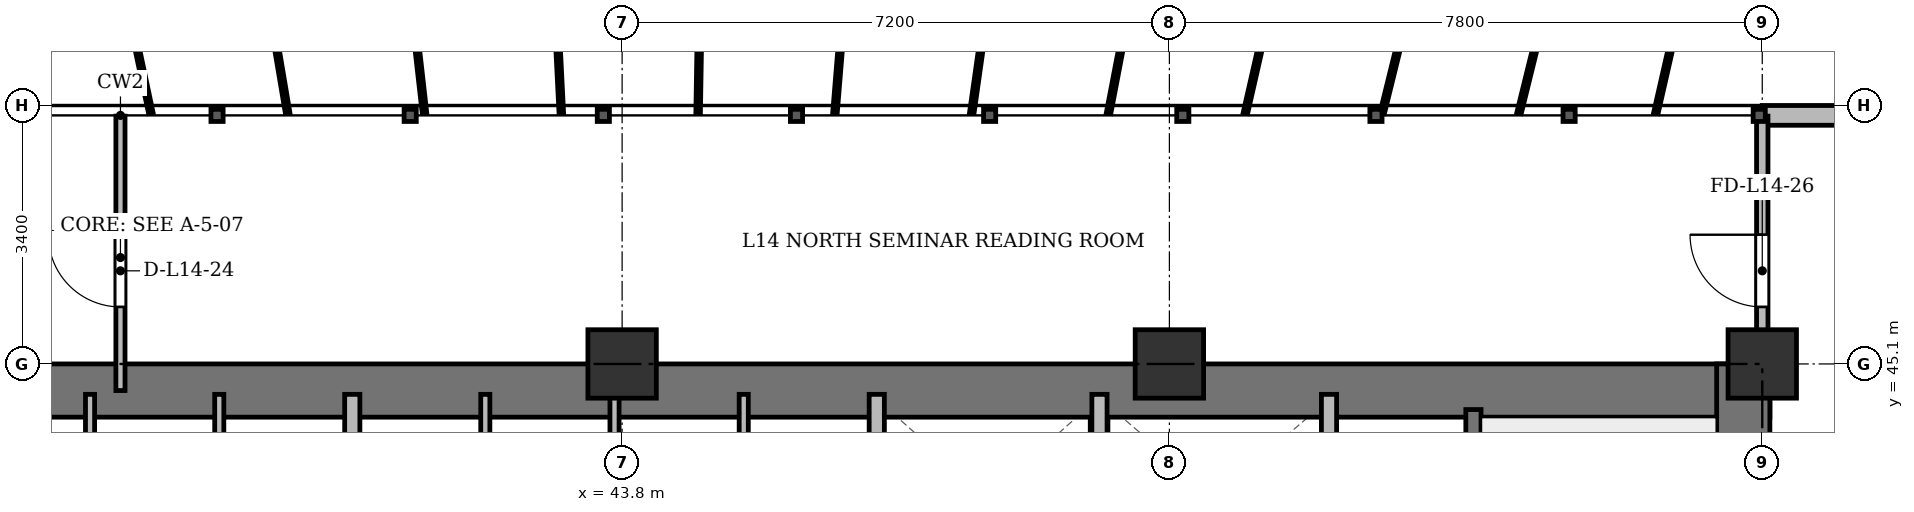
"""IFC4 building model, lengths in metres.
Left out: names, types, materials, properties, quantities, classifications, styles, units other than length and angle.
Written with IfcOpenShell. Run it as: python <this file> out.ifc"""

import sys

from ifc_helpers import new_model, si_unit, direction, frame, frame_2d, origin, origin_2d, place, context, subcontext, project, spatial, rectangle, extrude, source, transform, mapped, element, fill, save


model = new_model("IFC4")
c1 = context("Model", 3, precision=1e-05, world=origin(), true_north=direction((0.0, 1.0)))
c2 = subcontext(c1, "Body", "Model", "MODEL_VIEW")
j1 = project(units=[si_unit("LENGTHUNIT", "METRE"), si_unit("PLANEANGLEUNIT", "RADIAN")], contexts=[c1])
p1 = place(None, origin())
s1 = spatial("IfcSite", under=j1, at=p1, CompositionType="ELEMENT")
p2 = place(p1, origin())
s2 = spatial("IfcBuilding", under=s1, at=p2, CompositionType="ELEMENT")
p3 = place(p2, frame((0.0, 0.0, 55.9)))
s3 = spatial("IfcBuildingStorey", under=s2, at=p3, CompositionType="ELEMENT", Elevation=55.9)
m1 = source(origin(), c2, "Body", "SweptSolid", [
    extrude(rectangle(XDim=0.9, YDim=0.9, at=origin_2d()), origin(), (0.0, 0.0, 1.0), 3.6),
])
for number, where, z_axis, x_axis in (
    (1, (43.8, 45.1, 0.0), (0.0, 0.0, 1.0), (1.0, 0.0, 0.0)),
    (2, (51.0, 45.1, 0.0), (0.0, 0.0, 1.0), (1.0, 0.0, 0.0)),
    (3, (58.8, 45.1, 0.0), (0.0, 0.0, 1.0), (1.0, 0.0, 0.0)),
):
    element("IfcColumn", number, at=place(p3, frame(where, z_axis=z_axis, x_axis=x_axis)), inside=s3, PredefinedType="COLUMN", context=c2, shape_type="MappedRepresentation", body=[
        mapped(m1, transform((0.0, 0.0, 0.0), x_axis=(1.0, 0.0, 0.0), y_axis=(0.0, 1.0, 0.0), z_axis=(0.0, 0.0, 1.0), scale=1.0)),
    ])
p4 = place(p3, frame((58.8, 48.37, 0.0), z_axis=(0.0, 0.0, 1.0), x_axis=(1.0, 0.0, 0.0)))
e4 = element("IfcWall", 4, at=p4, inside=s3, PredefinedType="SOLIDWALL", context=c2, shape_type="SweptSolid", body=[
    extrude(rectangle(XDim=8.0, YDim=0.26, at=frame_2d((4.0, 0.0))), origin(), (0.0, 0.0, 1.0), 3.34),
])
p5 = place(p4, frame((3.308, 0.0, 0.9)))
e5 = element("IfcOpeningElement", 5, at=p5, cuts=e4, PredefinedType="OPENING", context=c2, shape_type="SweptSolid", body=[
    extrude(rectangle(XDim=1.2, YDim=1.65, at=frame_2d((0.6, 0.825))), frame((0.0, 0.14, 0.0), z_axis=(0.0, -1.0, 0.0), x_axis=(1.0, 0.0, 0.0)), (0.0, 0.0, 1.0), 0.28),
])
p6 = place(p3, frame((15.5, 44.75, 0.0), z_axis=(0.0, 0.0, 1.0), x_axis=(1.0, 0.0, 0.0)))
e6 = element("IfcWall", 6, at=p6, inside=s3, PredefinedType="SHEAR", context=c2, shape_type="SweptSolid", body=[
    extrude(rectangle(XDim=43.4, YDim=0.7, at=frame_2d((21.7, 0.0))), origin(), (0.0, 0.0, 1.0), 3.34),
])
p7 = place(p3, frame((58.55, 33.4, 0.0), z_axis=(0.0, 0.0, 1.0), x_axis=(0.0, 1.0, 0.0)))
e7 = element("IfcWall", 7, at=p7, inside=s3, PredefinedType="SHEAR", context=c2, shape_type="SweptSolid", body=[
    extrude(rectangle(XDim=11.7, YDim=0.7, at=frame_2d((5.85, 0.0))), origin(), (0.0, 0.0, 1.0), 3.34),
])
p8 = place(p3, frame((55.0, 33.4, 0.0), z_axis=(0.0, 0.0, 1.0), x_axis=(0.0, 1.0, 0.0)))
e8 = element("IfcWall", 8, at=p8, inside=s3, PredefinedType="SHEAR", context=c2, shape_type="SweptSolid", body=[
    extrude(rectangle(XDim=11.1, YDim=0.2, at=frame_2d((5.55, 0.0))), origin(), (0.0, 0.0, 1.0), 3.34),
])
p9 = place(p8, frame((0.85, 0.0, 0.0)))
e9 = element("IfcOpeningElement", 9, at=p9, cuts=e8, PredefinedType="OPENING", context=c2, shape_type="SweptSolid", body=[
    extrude(rectangle(XDim=1.1, YDim=2.15, at=frame_2d((0.55, 1.075))), frame((0.0, 0.11, 0.0), z_axis=(0.0, -1.0, 0.0), x_axis=(1.0, 0.0, 0.0)), (0.0, 0.0, 1.0), 0.22),
])
for number, where, z_axis, x_axis in (
    (10, (36.8, 41.5, 0.0), (0.0, 0.0, 1.0), (0.0, 1.0, 0.0)),
    (11, (38.5, 41.5, 0.0), (0.0, 0.0, 1.0), (0.0, 1.0, 0.0)),
):
    element("IfcWall", number, at=place(p3, frame(where, z_axis=z_axis, x_axis=x_axis)), inside=s3, PredefinedType="PARTITIONING", context=c2, shape_type="SweptSolid", body=[
        extrude(rectangle(XDim=3.2, YDim=0.12, at=frame_2d((1.6, 0.0))), origin(), (0.0, 0.0, 1.0), 3.34),
    ])
p10 = place(p3, frame((40.25, 41.5, 0.0), z_axis=(0.0, 0.0, 1.0), x_axis=(0.0, 1.0, 0.0)))
e12 = element("IfcWall", 12, at=p10, inside=s3, PredefinedType="SOLIDWALL", context=c2, shape_type="SweptSolid", body=[
    extrude(rectangle(XDim=3.2, YDim=0.2, at=frame_2d((1.6, 0.0))), origin(), (0.0, 0.0, 1.0), 3.34),
])
p11 = place(p3, frame((42.0, 41.5, 0.0), z_axis=(0.0, 0.0, 1.0), x_axis=(0.0, 1.0, 0.0)))
e13 = element("IfcWall", 13, at=p11, inside=s3, PredefinedType="PARTITIONING", context=c2, shape_type="SweptSolid", body=[
    extrude(rectangle(XDim=3.2, YDim=0.12, at=frame_2d((1.6, 0.0))), origin(), (0.0, 0.0, 1.0), 3.34),
])
p12 = place(p3, frame((43.7, 41.5, 0.0), z_axis=(0.0, 0.0, 1.0), x_axis=(0.0, 1.0, 0.0)))
e14 = element("IfcWall", 14, at=p12, inside=s3, PredefinedType="PARTITIONING", context=c2, shape_type="SweptSolid", body=[
    extrude(rectangle(XDim=3.2, YDim=0.12, at=frame_2d((1.6, 0.0))), origin(), (0.0, 0.0, 1.0), 2.752),
])
p13 = place(p3, frame((45.4, 41.5, 0.0), z_axis=(0.0, 0.0, 1.0), x_axis=(0.0, 1.0, 0.0)))
e15 = element("IfcWall", 15, at=p13, inside=s3, PredefinedType="PARTITIONING", context=c2, shape_type="SweptSolid", body=[
    extrude(rectangle(XDim=3.2, YDim=0.12, at=frame_2d((1.6, 0.0))), origin(), (0.0, 0.0, 1.0), 3.34),
])
p14 = place(p3, frame((47.15, 33.4, 0.0), z_axis=(0.0, 0.0, 1.0), x_axis=(0.0, 1.0, 0.0)))
e16 = element("IfcWall", 16, at=p14, inside=s3, PredefinedType="SOLIDWALL", context=c2, shape_type="SweptSolid", body=[
    extrude(rectangle(XDim=11.3, YDim=0.2, at=frame_2d((5.65, 0.0))), origin(), (0.0, 0.0, 1.0), 2.69),
])
for number, where, z_axis, x_axis in (
    (17, (50.08, 42.05, 0.0), (0.0, 0.0, 1.0), (0.0, 1.0, 0.0)),
    (18, (53.1, 42.05, 0.0), (0.0, 0.0, 1.0), (0.0, 1.0, 0.0)),
):
    element("IfcWall", number, at=place(p3, frame(where, z_axis=z_axis, x_axis=x_axis)), inside=s3, PredefinedType="SOLIDWALL", context=c2, shape_type="SweptSolid", body=[
        extrude(rectangle(XDim=2.65, YDim=0.2, at=frame_2d((1.325, 0.0))), origin(), (0.0, 0.0, 1.0), 3.34),
    ])
p15 = place(p3, frame((37.2, 44.75, 0.0), z_axis=(0.0, 0.0, 1.0), x_axis=(0.0, 1.0, 0.0)))
e19 = element("IfcWall", 19, at=p15, inside=s3, PredefinedType="PARTITIONING", context=c2, shape_type="SweptSolid", body=[
    extrude(rectangle(XDim=3.61, YDim=0.12, at=frame_2d((1.805, 0.0))), origin(), (0.0, 0.0, 1.0), 2.69),
])
p16 = place(p15, frame((1.1, 0.0, 0.0)))
e20 = element("IfcOpeningElement", 20, at=p16, cuts=e19, PredefinedType="OPENING", context=c2, shape_type="SweptSolid", body=[
    extrude(rectangle(XDim=0.95, YDim=2.15, at=frame_2d((0.475, 1.075))), frame((0.0, 0.07, 0.0), z_axis=(0.0, -1.0, 0.0), x_axis=(1.0, 0.0, 0.0)), (0.0, 0.0, 1.0), 0.14),
])
p17 = place(p3, frame((58.8, 44.75, 0.0), z_axis=(0.0, 0.0, 1.0), x_axis=(0.0, 1.0, 0.0)))
e21 = element("IfcWall", 21, at=p17, inside=s3, PredefinedType="PARTITIONING", context=c2, shape_type="SweptSolid", body=[
    extrude(rectangle(XDim=3.61, YDim=0.15, at=frame_2d((1.805, 0.0))), origin(), (0.0, 0.0, 1.0), 2.752),
])
p18 = place(p17, frame((1.1, 0.0, 0.0)))
e22 = element("IfcOpeningElement", 22, at=p18, cuts=e21, PredefinedType="OPENING", context=c2, shape_type="SweptSolid", body=[
    extrude(rectangle(XDim=0.95, YDim=2.15, at=frame_2d((0.475, 1.075))), frame((0.0, 0.085, 0.0), z_axis=(0.0, -1.0, 0.0), x_axis=(1.0, 0.0, 0.0)), (0.0, 0.0, 1.0), 0.17),
])
m2 = source(origin(), c2, "Body", "SweptSolid", [
    extrude(rectangle(XDim=0.95, YDim=2.15, at=frame_2d((0.475, 1.075))), frame((0.0, 0.025, 0.0), z_axis=(0.0, -1.0, 0.0), x_axis=(1.0, 0.0, 0.0)), (0.0, 0.0, 1.0), 0.05),
])
p19 = place(p16, origin())
e23 = element("IfcDoor", 23, at=p19, inside=s3, OperationType="SINGLE_SWING_RIGHT", PredefinedType="DOOR", context=c2, shape_type="MappedRepresentation", body=[
    mapped(m2, transform((0.0, 0.0, 0.0), x_axis=(1.0, 0.0, 0.0), y_axis=(0.0, 1.0, 0.0), z_axis=(0.0, 0.0, 1.0), scale=1.0)),
])
fill(e20, e23)
p20 = place(p18, origin())
e24 = element("IfcDoor", 24, at=p20, inside=s3, OperationType="SINGLE_SWING_RIGHT", PredefinedType="DOOR", context=c2, shape_type="MappedRepresentation", body=[
    mapped(m2, transform((0.0, 0.0, 0.0), x_axis=(1.0, 0.0, 0.0), y_axis=(0.0, 1.0, 0.0), z_axis=(0.0, 0.0, 1.0), scale=1.0)),
])
fill(e22, e24)
save(model, sys.argv[1])
